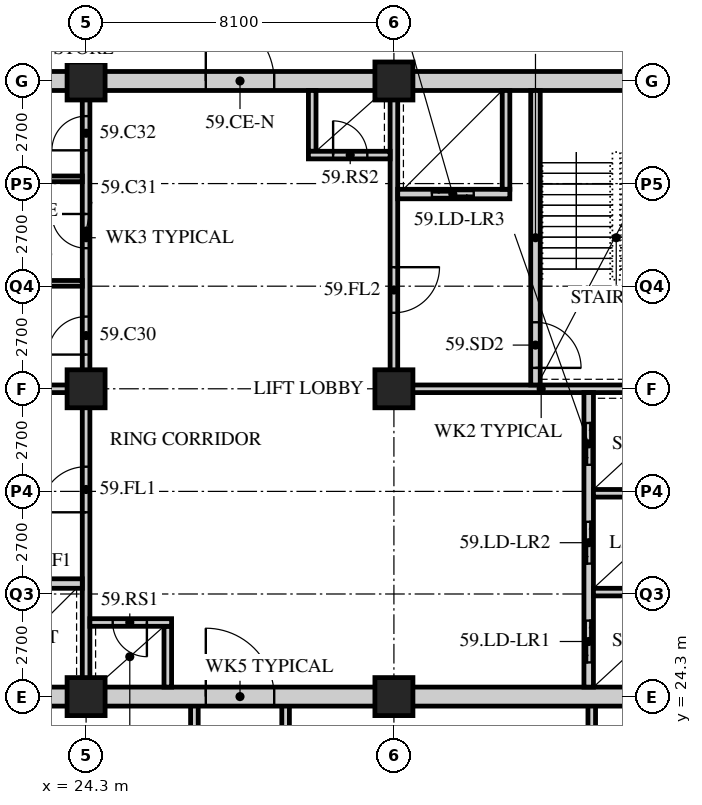
"""IFC4 building model, lengths in metres.
Left out: names, types, materials, properties, quantities, classifications, styles, units other than length and angle.
Written with IfcOpenShell. Run it as: python <this file> out.ifc"""

import sys

from ifc_helpers import new_model, si_unit, direction, frame, frame_2d, origin, origin_2d, place, context, subcontext, project, spatial, rectangle, hollow_rectangle, extrude, element, fill, save


model = new_model("IFC4")
c1 = context("Model", 3, precision=1e-05, world=origin(), true_north=direction((0.0, 1.0)))
c2 = subcontext(c1, "Body", "Model", "MODEL_VIEW")
j1 = project(units=[si_unit("LENGTHUNIT", "METRE"), si_unit("PLANEANGLEUNIT", "RADIAN")], contexts=[c1])
p1 = place(None, origin())
s1 = spatial("IfcSite", under=j1, at=p1, CompositionType="ELEMENT")
p2 = place(p1, origin())
s2 = spatial("IfcBuilding", under=s1, at=p2, CompositionType="ELEMENT")
p3 = place(p2, frame((0.0, 0.0, 228.0)))
s3 = spatial("IfcBuildingStorey", under=s2, at=p3, CompositionType="ELEMENT", Elevation=228.0)
for number, where, z_axis, x_axis in (
    (1, (24.3, 24.3, 0.0), (0.0, 0.0, 1.0), (1.0, 0.0, 0.0)),
    (2, (24.3, 32.4, 0.0), (0.0, 0.0, 1.0), (1.0, 0.0, 0.0)),
    (3, (24.3, 40.5, 0.0), (0.0, 0.0, 1.0), (1.0, 0.0, 0.0)),
    (4, (32.4, 24.3, 0.0), (0.0, 0.0, 1.0), (1.0, 0.0, 0.0)),
    (5, (32.4, 32.4, 0.0), (0.0, 0.0, 1.0), (1.0, 0.0, 0.0)),
    (6, (32.4, 40.5, 0.0), (0.0, 0.0, 1.0), (1.0, 0.0, 0.0)),
):
    element("IfcColumn", number, at=place(p3, frame(where, z_axis=z_axis, x_axis=x_axis)), inside=s3, PredefinedType="COLUMN", context=c2, shape_type="SweptSolid", body=[
        extrude(hollow_rectangle(XDim=1.0, YDim=1.0, WallThickness=0.1, at=origin_2d()), origin(), (0.0, 0.0, 1.0), 3.6),
    ])
for number, where, z_axis, x_axis in (
    (7, (37.606, 20.7, 0.0), (0.0, 0.0, 1.0), (0.0, 1.0, 0.0)),
    (8, (27.15, 20.7, 0.0), (0.0, 0.0, 1.0), (0.0, 1.0, 0.0)),
    (9, (29.55, 20.7, 0.0), (0.0, 0.0, 1.0), (0.0, 1.0, 0.0)),
):
    element("IfcWall", number, at=place(p3, frame(where, z_axis=z_axis, x_axis=x_axis)), inside=s3, PredefinedType="SOLIDWALL", context=c2, shape_type="SweptSolid", body=[
        extrude(rectangle(XDim=3.6, YDim=0.2, at=frame_2d((1.8, 0.0))), origin(), (0.0, 0.0, 1.0), 3.39),
    ])
p4 = place(p3, frame((15.95, 24.3, 0.0), z_axis=(0.0, 0.0, 1.0), x_axis=(1.0, 0.0, 0.0)))
e10 = element("IfcWall", 10, at=p4, inside=s3, PredefinedType="SOLIDWALL", context=c2, shape_type="SweptSolid", body=[
    extrude(rectangle(XDim=24.8, YDim=0.5, at=frame_2d((12.4, 0.0))), origin(), (0.0, 0.0, 1.0), 2.628),
])
p5 = place(p4, frame((11.5, 0.0, 0.0)))
e11 = element("IfcOpeningElement", 11, at=p5, cuts=e10, PredefinedType="OPENING", context=c2, shape_type="SweptSolid", body=[
    extrude(rectangle(XDim=1.8, YDim=2.4, at=frame_2d((0.9, 1.2))), frame((0.0, 0.26, 0.0), z_axis=(0.0, -1.0, 0.0), x_axis=(1.0, 0.0, 0.0)), (0.0, 0.0, 1.0), 0.52),
])
p6 = place(p3, frame((15.95, 40.5, 0.0), z_axis=(0.0, 0.0, 1.0), x_axis=(1.0, 0.0, 0.0)))
e12 = element("IfcWall", 12, at=p6, inside=s3, PredefinedType="SOLIDWALL", context=c2, shape_type="SweptSolid", body=[
    extrude(rectangle(XDim=24.8, YDim=0.5, at=frame_2d((12.4, 0.0))), origin(), (0.0, 0.0, 1.0), 2.628),
])
p7 = place(p6, frame((11.5, 0.0, 0.0)))
e13 = element("IfcOpeningElement", 13, at=p7, cuts=e12, PredefinedType="OPENING", context=c2, shape_type="SweptSolid", body=[
    extrude(rectangle(XDim=1.8, YDim=2.4, at=frame_2d((0.9, 1.2))), frame((0.0, 0.26, 0.0), z_axis=(0.0, -1.0, 0.0), x_axis=(1.0, 0.0, 0.0)), (0.0, 0.0, 1.0), 0.52),
])
p8 = place(p3, frame((16.45, 32.4, 0.0), z_axis=(0.0, 0.0, 1.0), x_axis=(1.0, 0.0, 0.0)))
e14 = element("IfcWall", 14, at=p8, inside=s3, PredefinedType="SOLIDWALL", context=c2, shape_type="SweptSolid", body=[
    extrude(rectangle(XDim=7.95, YDim=0.2, at=frame_2d((3.975, 0.0))), origin(), (0.0, 0.0, 1.0), 2.778),
])
p9 = place(p3, frame((24.3, 24.55, 0.0), z_axis=(0.0, 0.0, 1.0), x_axis=(0.0, 1.0, 0.0)))
e15 = element("IfcWall", 15, at=p9, inside=s3, PredefinedType="SOLIDWALL", context=c2, shape_type="SweptSolid", body=[
    extrude(rectangle(XDim=7.75, YDim=0.2, at=frame_2d((3.875, 0.0))), origin(), (0.0, 0.0, 1.0), 2.778),
])
p10 = place(p9, frame((4.6, 0.0, 0.0)))
e16 = element("IfcOpeningElement", 16, at=p10, cuts=e15, PredefinedType="OPENING", context=c2, shape_type="SweptSolid", body=[
    extrude(rectangle(XDim=1.2, YDim=2.1, at=frame_2d((0.6, 1.05))), frame((0.0, 0.11, 0.0), z_axis=(0.0, -1.0, 0.0), x_axis=(1.0, 0.0, 0.0)), (0.0, 0.0, 1.0), 0.22),
])
p11 = place(p3, frame((21.25, 27.275, 0.0), z_axis=(0.0, 0.0, 1.0), x_axis=(1.0, 0.0, 0.0)))
e17 = element("IfcWall", 17, at=p11, inside=s3, PredefinedType="SOLIDWALL", context=c2, shape_type="SweptSolid", body=[
    extrude(rectangle(XDim=2.95, YDim=0.25, at=frame_2d((1.475, 0.0))), origin(), (0.0, 0.0, 1.0), 3.39),
])
p12 = place(p11, frame((0.95, 0.0, 0.0)))
e18 = element("IfcOpeningElement", 18, at=p12, cuts=e17, PredefinedType="OPENING", context=c2, shape_type="SweptSolid", body=[
    extrude(rectangle(XDim=1.1, YDim=2.4, at=frame_2d((0.55, 1.2))), frame((0.0, 0.135, 0.0), z_axis=(0.0, -1.0, 0.0), x_axis=(1.0, 0.0, 0.0)), (0.0, 0.0, 1.0), 0.27),
])
p13 = place(p3, frame((26.45, 24.55, 0.0), z_axis=(0.0, 0.0, 1.0), x_axis=(0.0, 1.0, 0.0)))
e19 = element("IfcWall", 19, at=p13, inside=s3, PredefinedType="SOLIDWALL", context=c2, shape_type="SweptSolid", body=[
    extrude(rectangle(XDim=1.6, YDim=0.2, at=frame_2d((0.8, 0.0))), origin(), (0.0, 0.0, 1.0), 3.39),
])
p14 = place(p3, frame((24.4, 26.25, 0.0), z_axis=(0.0, 0.0, 1.0), x_axis=(1.0, 0.0, 0.0)))
e20 = element("IfcWall", 20, at=p14, inside=s3, PredefinedType="SOLIDWALL", context=c2, shape_type="SweptSolid", body=[
    extrude(rectangle(XDim=2.15, YDim=0.2, at=frame_2d((1.075, 0.0))), origin(), (0.0, 0.0, 1.0), 3.39),
])
p15 = place(p14, frame((0.6, 0.0, 0.0)))
e21 = element("IfcOpeningElement", 21, at=p15, cuts=e20, PredefinedType="OPENING", context=c2, shape_type="SweptSolid", body=[
    extrude(rectangle(XDim=0.9, YDim=2.1, at=frame_2d((0.45, 1.05))), frame((0.0, 0.11, 0.0), z_axis=(0.0, -1.0, 0.0), x_axis=(1.0, 0.0, 0.0)), (0.0, 0.0, 1.0), 0.22),
])
p16 = place(p3, frame((32.3, 32.4, 0.0), z_axis=(0.0, 0.0, 1.0), x_axis=(1.0, 0.0, 0.0)))
e22 = element("IfcWall", 22, at=p16, inside=s3, PredefinedType="SOLIDWALL", context=c2, shape_type="SweptSolid", body=[
    extrude(rectangle(XDim=7.95, YDim=0.2, at=frame_2d((3.975, 0.0))), origin(), (0.0, 0.0, 1.0), 2.778),
])
p17 = place(p3, frame((32.4, 32.5, 0.0), z_axis=(0.0, 0.0, 1.0), x_axis=(0.0, 1.0, 0.0)))
e23 = element("IfcWall", 23, at=p17, inside=s3, PredefinedType="SOLIDWALL", context=c2, shape_type="SweptSolid", body=[
    extrude(rectangle(XDim=7.75, YDim=0.2, at=frame_2d((3.875, 0.0))), origin(), (0.0, 0.0, 1.0), 2.778),
])
p18 = place(p17, frame((1.9, 0.0, 0.0)))
e24 = element("IfcOpeningElement", 24, at=p18, cuts=e23, PredefinedType="OPENING", context=c2, shape_type="SweptSolid", body=[
    extrude(rectangle(XDim=1.2, YDim=2.1, at=frame_2d((0.6, 1.05))), frame((0.0, 0.11, 0.0), z_axis=(0.0, -1.0, 0.0), x_axis=(1.0, 0.0, 0.0)), (0.0, 0.0, 1.0), 0.22),
])
p19 = place(p3, frame((37.525, 24.55, 0.0), z_axis=(0.0, 0.0, 1.0), x_axis=(0.0, 1.0, 0.0)))
e25 = element("IfcWall", 25, at=p19, inside=s3, PredefinedType="SOLIDWALL", context=c2, shape_type="SweptSolid", body=[
    extrude(rectangle(XDim=7.75, YDim=0.25, at=frame_2d((3.875, 0.0))), origin(), (0.0, 0.0, 1.0), 3.39),
])
p20 = place(p19, frame((0.65, 0.0, 0.0)))
e26 = element("IfcOpeningElement", 26, at=p20, cuts=e25, PredefinedType="OPENING", context=c2, shape_type="SweptSolid", body=[
    extrude(rectangle(XDim=1.1, YDim=2.4, at=frame_2d((0.55, 1.2))), frame((0.0, 0.135, 0.0), z_axis=(0.0, -1.0, 0.0), x_axis=(1.0, 0.0, 0.0)), (0.0, 0.0, 1.0), 0.27),
])
p21 = place(p19, frame((3.25, 0.0, 0.0)))
e27 = element("IfcOpeningElement", 27, at=p21, cuts=e25, PredefinedType="OPENING", context=c2, shape_type="SweptSolid", body=[
    extrude(rectangle(XDim=1.1, YDim=2.4, at=frame_2d((0.55, 1.2))), frame((0.0, 0.135, 0.0), z_axis=(0.0, -1.0, 0.0), x_axis=(1.0, 0.0, 0.0)), (0.0, 0.0, 1.0), 0.27),
])
p22 = place(p19, frame((5.85, 0.0, 0.0)))
e28 = element("IfcOpeningElement", 28, at=p22, cuts=e25, PredefinedType="OPENING", context=c2, shape_type="SweptSolid", body=[
    extrude(rectangle(XDim=1.1, YDim=2.4, at=frame_2d((0.55, 1.2))), frame((0.0, 0.135, 0.0), z_axis=(0.0, -1.0, 0.0), x_axis=(1.0, 0.0, 0.0)), (0.0, 0.0, 1.0), 0.27),
])
for number, where, z_axis, x_axis in (
    (29, (37.65, 27.05, 0.0), (0.0, 0.0, 1.0), (1.0, 0.0, 0.0)),
    (30, (37.65, 29.65, 0.0), (0.0, 0.0, 1.0), (1.0, 0.0, 0.0)),
):
    element("IfcWall", number, at=place(p3, frame(where, z_axis=z_axis, x_axis=x_axis)), inside=s3, PredefinedType="SOLIDWALL", context=c2, shape_type="SweptSolid", body=[
        extrude(rectangle(XDim=2.6, YDim=0.2, at=frame_2d((1.3, 0.0))), origin(), (0.0, 0.0, 1.0), 3.39),
    ])
p23 = place(p3, frame((36.125, 32.5, 0.0), z_axis=(0.0, 0.0, 1.0), x_axis=(0.0, 1.0, 0.0)))
e31 = element("IfcWall", 31, at=p23, inside=s3, PredefinedType="SOLIDWALL", context=c2, shape_type="SweptSolid", body=[
    extrude(rectangle(XDim=7.75, YDim=0.25, at=frame_2d((3.875, 0.0))), origin(), (0.0, 0.0, 1.0), 3.39),
])
p24 = place(p23, frame((0.45, 0.0, 0.0)))
e32 = element("IfcOpeningElement", 32, at=p24, cuts=e31, PredefinedType="OPENING", context=c2, shape_type="SweptSolid", body=[
    extrude(rectangle(XDim=1.2, YDim=2.1, at=frame_2d((0.6, 1.05))), frame((0.0, 0.135, 0.0), z_axis=(0.0, -1.0, 0.0), x_axis=(1.0, 0.0, 0.0)), (0.0, 0.0, 1.0), 0.27),
])
p25 = place(p3, frame((32.5, 37.525, 0.0), z_axis=(0.0, 0.0, 1.0), x_axis=(1.0, 0.0, 0.0)))
e33 = element("IfcWall", 33, at=p25, inside=s3, PredefinedType="SOLIDWALL", context=c2, shape_type="SweptSolid", body=[
    extrude(rectangle(XDim=2.95, YDim=0.25, at=frame_2d((1.475, 0.0))), origin(), (0.0, 0.0, 1.0), 3.39),
])
p26 = place(p25, frame((0.9, 0.0, 0.0)))
e34 = element("IfcOpeningElement", 34, at=p26, cuts=e33, PredefinedType="OPENING", context=c2, shape_type="SweptSolid", body=[
    extrude(rectangle(XDim=1.1, YDim=2.4, at=frame_2d((0.55, 1.2))), frame((0.0, 0.135, 0.0), z_axis=(0.0, -1.0, 0.0), x_axis=(1.0, 0.0, 0.0)), (0.0, 0.0, 1.0), 0.27),
])
p27 = place(p3, frame((35.35, 37.65, 0.0), z_axis=(0.0, 0.0, 1.0), x_axis=(0.0, 1.0, 0.0)))
e35 = element("IfcWall", 35, at=p27, inside=s3, PredefinedType="SOLIDWALL", context=c2, shape_type="SweptSolid", body=[
    extrude(rectangle(XDim=2.6, YDim=0.2, at=frame_2d((1.3, 0.0))), origin(), (0.0, 0.0, 1.0), 3.39),
])
p28 = place(p3, frame((30.25, 38.65, 0.0), z_axis=(0.0, 0.0, 1.0), x_axis=(0.0, 1.0, 0.0)))
e36 = element("IfcWall", 36, at=p28, inside=s3, PredefinedType="SOLIDWALL", context=c2, shape_type="SweptSolid", body=[
    extrude(rectangle(XDim=1.6, YDim=0.2, at=frame_2d((0.8, 0.0))), origin(), (0.0, 0.0, 1.0), 3.39),
])
p29 = place(p3, frame((30.15, 38.55, 0.0), z_axis=(0.0, 0.0, 1.0), x_axis=(1.0, 0.0, 0.0)))
e37 = element("IfcWall", 37, at=p29, inside=s3, PredefinedType="SOLIDWALL", context=c2, shape_type="SweptSolid", body=[
    extrude(rectangle(XDim=2.15, YDim=0.2, at=frame_2d((1.075, 0.0))), origin(), (0.0, 0.0, 1.0), 3.39),
])
p30 = place(p29, frame((0.65, 0.0, 0.0)))
e38 = element("IfcOpeningElement", 38, at=p30, cuts=e37, PredefinedType="OPENING", context=c2, shape_type="SweptSolid", body=[
    extrude(rectangle(XDim=0.9, YDim=2.1, at=frame_2d((0.45, 1.05))), frame((0.0, 0.11, 0.0), z_axis=(0.0, -1.0, 0.0), x_axis=(1.0, 0.0, 0.0)), (0.0, 0.0, 1.0), 0.22),
])
p31 = place(p3, frame((24.3, 32.5, 0.0), z_axis=(0.0, 0.0, 1.0), x_axis=(0.0, 1.0, 0.0)))
e39 = element("IfcWall", 39, at=p31, inside=s3, PredefinedType="PARTITIONING", context=c2, shape_type="SweptSolid", body=[
    extrude(rectangle(XDim=7.75, YDim=0.2, at=frame_2d((3.875, 0.0))), origin(), (0.0, 0.0, 1.0), 2.778),
])
p32 = place(p31, frame((0.8, 0.0, 0.0)))
e40 = element("IfcOpeningElement", 40, at=p32, cuts=e39, PredefinedType="OPENING", context=c2, shape_type="SweptSolid", body=[
    extrude(rectangle(XDim=1.0, YDim=2.1, at=frame_2d((0.5, 1.05))), frame((0.0, 0.11, 0.0), z_axis=(0.0, -1.0, 0.0), x_axis=(1.0, 0.0, 0.0)), (0.0, 0.0, 1.0), 0.22),
])
p33 = place(p31, frame((3.6, 0.0, 0.0)))
e41 = element("IfcOpeningElement", 41, at=p33, cuts=e39, PredefinedType="OPENING", context=c2, shape_type="SweptSolid", body=[
    extrude(rectangle(XDim=0.9, YDim=2.1, at=frame_2d((0.45, 1.05))), frame((0.0, 0.11, 0.0), z_axis=(0.0, -1.0, 0.0), x_axis=(1.0, 0.0, 0.0)), (0.0, 0.0, 1.0), 0.22),
])
p34 = place(p31, frame((6.175, 0.0, 0.0)))
e42 = element("IfcOpeningElement", 42, at=p34, cuts=e39, PredefinedType="OPENING", context=c2, shape_type="SweptSolid", body=[
    extrude(rectangle(XDim=0.9, YDim=2.1, at=frame_2d((0.45, 1.05))), frame((0.0, 0.11, 0.0), z_axis=(0.0, -1.0, 0.0), x_axis=(1.0, 0.0, 0.0)), (0.0, 0.0, 1.0), 0.22),
])
for number, where, z_axis, x_axis in (
    (43, (21.65, 35.175, 0.0), (0.0, 0.0, 1.0), (1.0, 0.0, 0.0)),
    (44, (21.65, 37.925, 0.0), (0.0, 0.0, 1.0), (1.0, 0.0, 0.0)),
):
    element("IfcWall", number, at=place(p3, frame(where, z_axis=z_axis, x_axis=x_axis)), inside=s3, PredefinedType="PARTITIONING", context=c2, shape_type="SweptSolid", body=[
        extrude(rectangle(XDim=2.55, YDim=0.15, at=frame_2d((1.275, 0.0))), origin(), (0.0, 0.0, 1.0), 3.39),
    ])
p35 = place(p32, origin())
e45 = element("IfcDoor", 45, at=p35, inside=s3, OperationType="SINGLE_SWING_LEFT", PredefinedType="DOOR", context=c2, shape_type="SweptSolid", body=[
    extrude(rectangle(XDim=1.0, YDim=2.1, at=frame_2d((0.5, 1.05))), frame((0.0, 0.025, 0.0), z_axis=(0.0, -1.0, 0.0), x_axis=(1.0, 0.0, 0.0)), (0.0, 0.0, 1.0), 0.05),
])
fill(e40, e45)
p36 = place(p33, origin())
e46 = element("IfcDoor", 46, at=p36, inside=s3, OperationType="SINGLE_SWING_RIGHT", PredefinedType="DOOR", context=c2, shape_type="SweptSolid", body=[
    extrude(rectangle(XDim=0.9, YDim=2.1, at=frame_2d((0.45, 1.05))), frame((0.0, 0.025, 0.0), z_axis=(0.0, -1.0, 0.0), x_axis=(1.0, 0.0, 0.0)), (0.0, 0.0, 1.0), 0.05),
])
fill(e41, e46)
p37 = place(p34, origin())
e47 = element("IfcDoor", 47, at=p37, inside=s3, OperationType="SINGLE_SWING_LEFT", PredefinedType="DOOR", context=c2, shape_type="SweptSolid", body=[
    extrude(rectangle(XDim=0.9, YDim=2.1, at=frame_2d((0.45, 1.05))), frame((0.0, 0.025, 0.0), z_axis=(0.0, -1.0, 0.0), x_axis=(1.0, 0.0, 0.0)), (0.0, 0.0, 1.0), 0.05),
])
fill(e42, e47)
p38 = place(p10, origin())
e48 = element("IfcDoor", 48, at=p38, inside=s3, OperationType="SINGLE_SWING_LEFT", PredefinedType="DOOR", context=c2, shape_type="SweptSolid", body=[
    extrude(rectangle(XDim=1.2, YDim=2.1, at=frame_2d((0.6, 1.05))), frame((0.0, 0.025, 0.0), z_axis=(0.0, -1.0, 0.0), x_axis=(1.0, 0.0, 0.0)), (0.0, 0.0, 1.0), 0.05),
])
fill(e16, e48)
p39 = place(p15, origin())
e49 = element("IfcDoor", 49, at=p39, inside=s3, OperationType="SINGLE_SWING_LEFT", PredefinedType="DOOR", context=c2, shape_type="SweptSolid", body=[
    extrude(rectangle(XDim=0.9, YDim=2.1, at=frame_2d((0.45, 1.05))), frame((0.0, 0.025, 0.0), z_axis=(0.0, -1.0, 0.0), x_axis=(1.0, 0.0, 0.0)), (0.0, 0.0, 1.0), 0.05),
])
fill(e21, e49)
p40 = place(p24, origin())
e50 = element("IfcDoor", 50, at=p40, inside=s3, OperationType="SINGLE_SWING_RIGHT", PredefinedType="DOOR", context=c2, shape_type="SweptSolid", body=[
    extrude(rectangle(XDim=1.2, YDim=2.1, at=frame_2d((0.6, 1.05))), frame((0.0, 0.025, 0.0), z_axis=(0.0, -1.0, 0.0), x_axis=(1.0, 0.0, 0.0)), (0.0, 0.0, 1.0), 0.05),
])
fill(e32, e50)
p41 = place(p18, origin())
e51 = element("IfcDoor", 51, at=p41, inside=s3, OperationType="SINGLE_SWING_LEFT", PredefinedType="DOOR", context=c2, shape_type="SweptSolid", body=[
    extrude(rectangle(XDim=1.2, YDim=2.1, at=frame_2d((0.6, 1.05))), frame((0.0, 0.025, 0.0), z_axis=(0.0, -1.0, 0.0), x_axis=(1.0, 0.0, 0.0)), (0.0, 0.0, 1.0), 0.05),
])
fill(e24, e51)
p42 = place(p30, origin())
e52 = element("IfcDoor", 52, at=p42, inside=s3, OperationType="SINGLE_SWING_LEFT", PredefinedType="DOOR", context=c2, shape_type="SweptSolid", body=[
    extrude(rectangle(XDim=0.9, YDim=2.1, at=frame_2d((0.45, 1.05))), frame((0.0, 0.025, 0.0), z_axis=(0.0, -1.0, 0.0), x_axis=(1.0, 0.0, 0.0)), (0.0, 0.0, 1.0), 0.05),
])
fill(e38, e52)
p43 = place(p20, origin())
e53 = element("IfcDoor", 53, at=p43, inside=s3, OperationType="DOUBLE_DOOR_SLIDING", PredefinedType="DOOR", context=c2, shape_type="SweptSolid", body=[
    extrude(rectangle(XDim=1.1, YDim=2.4, at=frame_2d((0.55, 1.2))), frame((0.0, 0.025, 0.0), z_axis=(0.0, -1.0, 0.0), x_axis=(1.0, 0.0, 0.0)), (0.0, 0.0, 1.0), 0.05),
])
fill(e26, e53)
p44 = place(p21, origin())
e54 = element("IfcDoor", 54, at=p44, inside=s3, OperationType="DOUBLE_DOOR_SLIDING", PredefinedType="DOOR", context=c2, shape_type="SweptSolid", body=[
    extrude(rectangle(XDim=1.1, YDim=2.4, at=frame_2d((0.55, 1.2))), frame((0.0, 0.025, 0.0), z_axis=(0.0, -1.0, 0.0), x_axis=(1.0, 0.0, 0.0)), (0.0, 0.0, 1.0), 0.05),
])
fill(e27, e54)
p45 = place(p22, origin())
e55 = element("IfcDoor", 55, at=p45, inside=s3, OperationType="DOUBLE_DOOR_SLIDING", PredefinedType="DOOR", context=c2, shape_type="SweptSolid", body=[
    extrude(rectangle(XDim=1.1, YDim=2.4, at=frame_2d((0.55, 1.2))), frame((0.0, 0.025, 0.0), z_axis=(0.0, -1.0, 0.0), x_axis=(1.0, 0.0, 0.0)), (0.0, 0.0, 1.0), 0.05),
])
fill(e28, e55)
p46 = place(p26, origin())
e56 = element("IfcDoor", 56, at=p46, inside=s3, OperationType="DOUBLE_DOOR_SLIDING", PredefinedType="DOOR", context=c2, shape_type="SweptSolid", body=[
    extrude(rectangle(XDim=1.1, YDim=2.4, at=frame_2d((0.55, 1.2))), frame((0.0, 0.025, 0.0), z_axis=(0.0, -1.0, 0.0), x_axis=(1.0, 0.0, 0.0)), (0.0, 0.0, 1.0), 0.05),
])
fill(e34, e56)
p47 = place(p5, origin())
e57 = element("IfcDoor", 57, at=p47, inside=s3, OperationType="DOUBLE_DOOR_SINGLE_SWING", PredefinedType="DOOR", context=c2, shape_type="SweptSolid", body=[
    extrude(rectangle(XDim=1.8, YDim=2.4, at=frame_2d((0.9, 1.2))), frame((0.0, 0.025, 0.0), z_axis=(0.0, -1.0, 0.0), x_axis=(1.0, 0.0, 0.0)), (0.0, 0.0, 1.0), 0.05),
])
fill(e11, e57)
p48 = place(p7, origin())
e58 = element("IfcDoor", 58, at=p48, inside=s3, OperationType="DOUBLE_DOOR_SINGLE_SWING", PredefinedType="DOOR", context=c2, shape_type="SweptSolid", body=[
    extrude(rectangle(XDim=1.8, YDim=2.4, at=frame_2d((0.9, 1.2))), frame((0.0, 0.025, 0.0), z_axis=(0.0, -1.0, 0.0), x_axis=(1.0, 0.0, 0.0)), (0.0, 0.0, 1.0), 0.05),
])
fill(e13, e58)
save(model, sys.argv[1])
